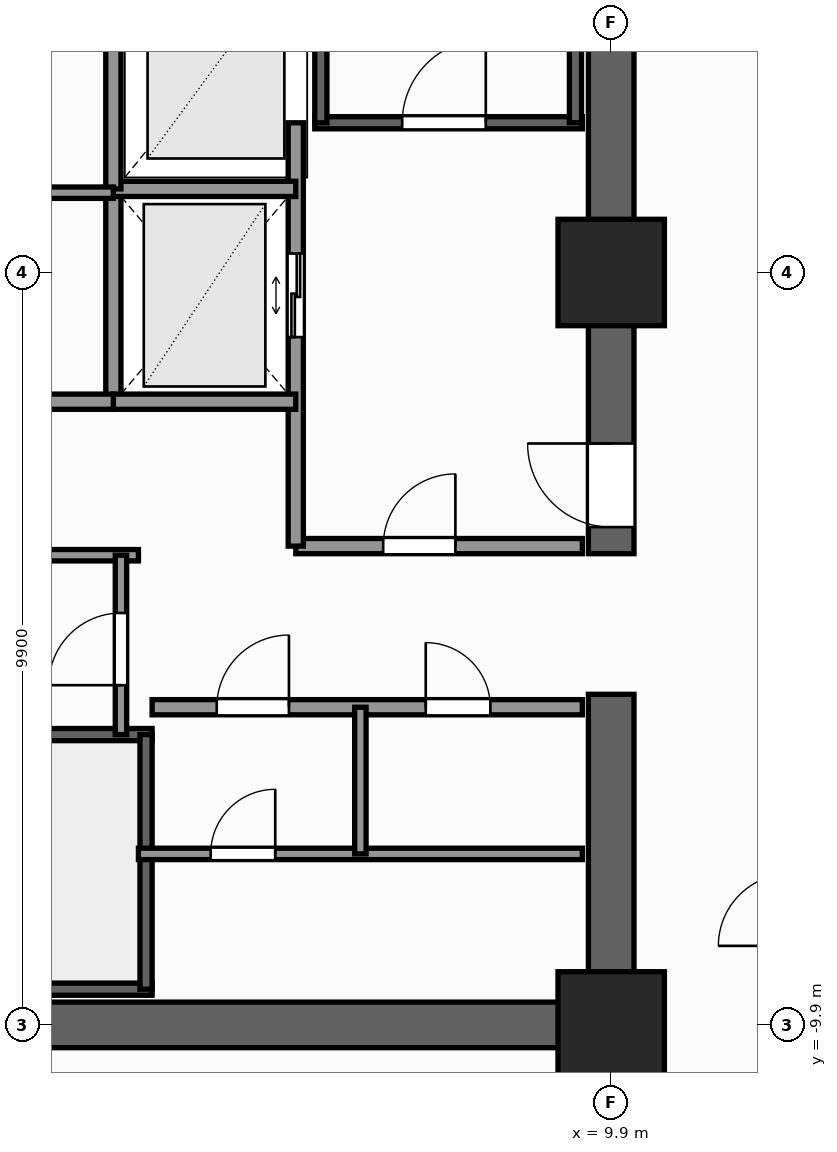
"""IFC4 building model, lengths in metres.
Left out: names, types, materials, properties, quantities, classifications, styles, units other than length and angle.
Written with IfcOpenShell. Run it as: python <this file> out.ifc"""

import sys

from ifc_helpers import new_model, si_unit, direction, frame, frame_2d, origin, origin_2d, place, context, subcontext, project, spatial, rectangle, extrude, element, fill, save


model = new_model("IFC4")
c1 = context("Model", 3, precision=1e-05, world=origin(), true_north=direction((0.0, 1.0)))
c2 = subcontext(c1, "Body", "Model", "MODEL_VIEW")
j1 = project(units=[si_unit("LENGTHUNIT", "METRE"), si_unit("PLANEANGLEUNIT", "RADIAN")], contexts=[c1])
p1 = place(None, origin())
s1 = spatial("IfcSite", under=j1, at=p1, CompositionType="ELEMENT")
p2 = place(p1, origin())
s2 = spatial("IfcBuilding", under=s1, at=p2, CompositionType="ELEMENT")
p3 = place(p2, frame((0.0, 0.0, 68.0)))
s3 = spatial("IfcBuildingStorey", under=s2, at=p3, CompositionType="ELEMENT", Elevation=68.0)
p4 = place(p3, frame((10.2, -9.9, 0.0), z_axis=(0.0, 0.0, 1.0), x_axis=(-1.0, 0.0, 0.0)))
e1 = element("IfcWall", 1, at=p4, inside=s3, PredefinedType="SHEAR", context=c2, shape_type="SweptSolid", body=[
    extrude(rectangle(XDim=12.06, YDim=0.6, at=frame_2d((6.03, 0.0))), origin(), (0.0, 0.0, 1.0), 4.2),
])
p5 = place(p3, frame((9.9, -9.6, 0.0), z_axis=(0.0, 0.0, 1.0), x_axis=(0.0, 1.0, 0.0)))
e2 = element("IfcWall", 2, at=p5, inside=s3, PredefinedType="SHEAR", context=c2, shape_type="SweptSolid", body=[
    extrude(rectangle(XDim=4.05, YDim=0.6, at=frame_2d((2.025, 0.0))), origin(), (0.0, 0.0, 1.0), 4.2),
])
p6 = place(p3, frame((9.9, -3.7, 0.0), z_axis=(0.0, 0.0, 1.0), x_axis=(0.0, 1.0, 0.0)))
e3 = element("IfcWall", 3, at=p6, inside=s3, PredefinedType="SHEAR", context=c2, shape_type="SweptSolid", body=[
    extrude(rectangle(XDim=13.3, YDim=0.6, at=frame_2d((6.65, 0.0))), origin(), (0.0, 0.0, 1.0), 4.2),
])
p7 = place(p6, frame((0.35, 0.0, 0.0)))
e4 = element("IfcOpeningElement", 4, at=p7, cuts=e3, PredefinedType="OPENING", context=c2, shape_type="SweptSolid", body=[
    extrude(rectangle(XDim=1.1, YDim=2.2, at=frame_2d((0.55, 1.1))), frame((0.0, 0.31, 0.0), z_axis=(0.0, -1.0, 0.0), x_axis=(1.0, 0.0, 0.0)), (0.0, 0.0, 1.0), 0.62),
])
for number, where, z_axis, x_axis in (
    (5, (9.9, -9.9, 0.0), (0.0, 0.0, 1.0), (1.0, 0.0, 0.0)),
    (6, (9.9, 0.0, 0.0), (0.0, 0.0, 1.0), (1.0, 0.0, 0.0)),
):
    element("IfcColumn", number, at=place(p3, frame(where, z_axis=z_axis, x_axis=x_axis)), inside=s3, PredefinedType="COLUMN", context=c2, shape_type="SweptSolid", body=[
        extrude(rectangle(XDim=1.4, YDim=1.4, at=origin_2d()), origin(), (0.0, 0.0, 1.0), 4.2),
    ])
p8 = place(p3, frame((6.0, 1.97, 0.0), z_axis=(0.0, 0.0, 1.0), x_axis=(1.0, 0.0, 0.0)))
e7 = element("IfcWall", 7, at=p8, inside=s3, PredefinedType="SHEAR", context=c2, shape_type="SweptSolid", body=[
    extrude(rectangle(XDim=3.52, YDim=0.16, at=frame_2d((1.76, 0.0))), origin(), (0.0, 0.0, 1.0), 4.2),
])
p9 = place(p8, frame((1.15, 0.0, 0.0)))
e8 = element("IfcOpeningElement", 8, at=p9, cuts=e7, PredefinedType="OPENING", context=c2, shape_type="SweptSolid", body=[
    extrude(rectangle(XDim=1.1, YDim=2.2, at=frame_2d((0.55, 1.1))), frame((0.0, 0.09, 0.0), z_axis=(0.0, -1.0, 0.0), x_axis=(1.0, 0.0, 0.0)), (0.0, 0.0, 1.0), 0.18),
])
for number, where, z_axis, x_axis in (
    (9, (6.08, 1.97, 0.0), (0.0, 0.0, 1.0), (0.0, 1.0, 0.0)),
    (10, (9.43, 1.97, 0.0), (0.0, 0.0, 1.0), (0.0, 1.0, 0.0)),
):
    element("IfcWall", number, at=place(p3, frame(where, z_axis=z_axis, x_axis=x_axis)), inside=s3, PredefinedType="SHEAR", context=c2, shape_type="SweptSolid", body=[
        extrude(rectangle(XDim=7.56, YDim=0.16, at=frame_2d((3.78, 0.0))), origin(), (0.0, 0.0, 1.0), 4.2),
    ])
p10 = place(p3, frame((3.86, -9.43, 0.0), z_axis=(0.0, 0.0, 1.0), x_axis=(-1.0, 0.0, 0.0)))
e11 = element("IfcWall", 11, at=p10, inside=s3, PredefinedType="SHEAR", context=c2, shape_type="SweptSolid", body=[
    extrude(rectangle(XDim=7.72, YDim=0.16, at=frame_2d((3.86, 0.0))), origin(), (0.0, 0.0, 1.0), 4.2),
])
p11 = place(p10, frame((6.01, 0.0, 0.0)))
e12 = element("IfcOpeningElement", 12, at=p11, cuts=e11, PredefinedType="OPENING", context=c2, shape_type="SweptSolid", body=[
    extrude(rectangle(XDim=1.1, YDim=2.2, at=frame_2d((0.55, 1.1))), frame((0.0, 0.09, 0.0), z_axis=(0.0, -1.0, 0.0), x_axis=(1.0, 0.0, 0.0)), (0.0, 0.0, 1.0), 0.18),
])
p12 = place(p3, frame((-3.86, -6.08, 0.0), z_axis=(0.0, 0.0, 1.0), x_axis=(1.0, 0.0, 0.0)))
e13 = element("IfcWall", 13, at=p12, inside=s3, PredefinedType="SHEAR", context=c2, shape_type="SweptSolid", body=[
    extrude(rectangle(XDim=7.72, YDim=0.16, at=frame_2d((3.86, 0.0))), origin(), (0.0, 0.0, 1.0), 4.2),
])
p13 = place(p3, frame((3.78, -9.43, 0.0), z_axis=(0.0, 0.0, 1.0), x_axis=(0.0, 1.0, 0.0)))
e14 = element("IfcWall", 14, at=p13, inside=s3, PredefinedType="SHEAR", context=c2, shape_type="SweptSolid", body=[
    extrude(rectangle(XDim=3.35, YDim=0.16, at=frame_2d((1.675, 0.0))), origin(), (0.0, 0.0, 1.0), 4.2),
])
p14 = place(p3, frame((5.75, -3.6, 0.0), z_axis=(0.0, 0.0, 1.0), x_axis=(1.0, 0.0, 0.0)))
e15 = element("IfcWall", 15, at=p14, inside=s3, PredefinedType="SOLIDWALL", context=c2, shape_type="SweptSolid", body=[
    extrude(rectangle(XDim=3.77, YDim=0.2, at=frame_2d((1.885, 0.0))), origin(), (0.0, 0.0, 1.0), 3.98),
])
p15 = place(p14, frame((1.15, 0.0, 0.0)))
e16 = element("IfcOpeningElement", 16, at=p15, cuts=e15, PredefinedType="OPENING", context=c2, shape_type="SweptSolid", body=[
    extrude(rectangle(XDim=0.95, YDim=2.06, at=frame_2d((0.475, 1.03))), frame((0.0, 0.11, 0.0), z_axis=(0.0, -1.0, 0.0), x_axis=(1.0, 0.0, 0.0)), (0.0, 0.0, 1.0), 0.22),
])
p16 = place(p3, frame((5.75, -3.6, 0.0), z_axis=(0.0, 0.0, 1.0), x_axis=(0.0, 1.0, 0.0)))
e17 = element("IfcWall", 17, at=p16, inside=s3, PredefinedType="SOLIDWALL", context=c2, shape_type="SweptSolid", body=[
    extrude(rectangle(XDim=5.57, YDim=0.2, at=frame_2d((2.785, 0.0))), origin(), (0.0, 0.0, 1.0), 3.98),
])
p17 = place(p16, frame((2.75, 0.0, 0.0)))
e18 = element("IfcOpeningElement", 18, at=p17, cuts=e17, PredefinedType="OPENING", context=c2, shape_type="SweptSolid", body=[
    extrude(rectangle(XDim=1.1, YDim=2.2, at=frame_2d((0.55, 1.1))), frame((0.0, 0.11, 0.0), z_axis=(0.0, -1.0, 0.0), x_axis=(1.0, 0.0, 0.0)), (0.0, 0.0, 1.0), 0.22),
])
p18 = place(p3, frame((3.35, -1.7, 0.0), z_axis=(0.0, 0.0, 1.0), x_axis=(0.0, 1.0, 0.0)))
e19 = element("IfcWall", 19, at=p18, inside=s3, PredefinedType="SOLIDWALL", context=c2, shape_type="SweptSolid", body=[
    extrude(rectangle(XDim=2.8, YDim=0.2, at=frame_2d((1.4, 0.0))), origin(), (0.0, 0.0, 1.0), 3.98),
])
for number, where, z_axis, x_axis in (
    (20, (3.35, -1.7, 0.0), (0.0, 0.0, 1.0), (1.0, 0.0, 0.0)),
    (21, (3.35, 1.1, 0.0), (0.0, 0.0, 1.0), (1.0, 0.0, 0.0)),
):
    element("IfcWall", number, at=place(p3, frame(where, z_axis=z_axis, x_axis=x_axis)), inside=s3, PredefinedType="SOLIDWALL", context=c2, shape_type="SweptSolid", body=[
        extrude(rectangle(XDim=2.4, YDim=0.2, at=frame_2d((1.2, 0.0))), origin(), (0.0, 0.0, 1.0), 3.98),
    ])
p19 = place(p3, frame((3.86, -5.72, 0.0), z_axis=(0.0, 0.0, 1.0), x_axis=(1.0, 0.0, 0.0)))
e22 = element("IfcWall", 22, at=p19, inside=s3, PredefinedType="SOLIDWALL", context=c2, shape_type="SweptSolid", body=[
    extrude(rectangle(XDim=5.66, YDim=0.2, at=frame_2d((2.83, 0.0))), origin(), (0.0, 0.0, 1.0), 3.98),
])
p20 = place(p19, frame((0.85, 0.0, 0.0)))
e23 = element("IfcOpeningElement", 23, at=p20, cuts=e22, PredefinedType="OPENING", context=c2, shape_type="SweptSolid", body=[
    extrude(rectangle(XDim=0.95, YDim=2.06, at=frame_2d((0.475, 1.03))), frame((0.0, 0.11, 0.0), z_axis=(0.0, -1.0, 0.0), x_axis=(1.0, 0.0, 0.0)), (0.0, 0.0, 1.0), 0.22),
])
p21 = place(p19, frame((3.6, 0.0, 0.0)))
e24 = element("IfcOpeningElement", 24, at=p21, cuts=e22, PredefinedType="OPENING", context=c2, shape_type="SweptSolid", body=[
    extrude(rectangle(XDim=0.85, YDim=2.03, at=frame_2d((0.425, 1.015))), frame((0.0, 0.11, 0.0), z_axis=(0.0, -1.0, 0.0), x_axis=(1.0, 0.0, 0.0)), (0.0, 0.0, 1.0), 0.22),
])
p22 = place(p3, frame((3.68, -7.65, 0.0), z_axis=(0.0, 0.0, 1.0), x_axis=(1.0, 0.0, 0.0)))
e25 = element("IfcWall", 25, at=p22, inside=s3, PredefinedType="PARTITIONING", context=c2, shape_type="SweptSolid", body=[
    extrude(rectangle(XDim=5.84, YDim=0.15, at=frame_2d((2.92, 0.0))), origin(), (0.0, 0.0, 1.0), 3.98),
])
p23 = place(p22, frame((0.95, 0.0, 0.0)))
e26 = element("IfcOpeningElement", 26, at=p23, cuts=e25, PredefinedType="OPENING", context=c2, shape_type="SweptSolid", body=[
    extrude(rectangle(XDim=0.85, YDim=2.03, at=frame_2d((0.425, 1.015))), frame((0.0, 0.085, 0.0), z_axis=(0.0, -1.0, 0.0), x_axis=(1.0, 0.0, 0.0)), (0.0, 0.0, 1.0), 0.17),
])
p24 = place(p3, frame((6.6, -7.65, 0.0), z_axis=(0.0, 0.0, 1.0), x_axis=(0.0, 1.0, 0.0)))
e27 = element("IfcWall", 27, at=p24, inside=s3, PredefinedType="PARTITIONING", context=c2, shape_type="SweptSolid", body=[
    extrude(rectangle(XDim=1.93, YDim=0.15, at=frame_2d((0.965, 0.0))), origin(), (0.0, 0.0, 1.0), 3.98),
])
p25 = place(p3, frame((-3.35, -1.7, 0.0), z_axis=(0.0, 0.0, 1.0), x_axis=(1.0, 0.0, 0.0)))
e28 = element("IfcWall", 28, at=p25, inside=s3, PredefinedType="SOLIDWALL", context=c2, shape_type="SweptSolid", body=[
    extrude(rectangle(XDim=6.7, YDim=0.2, at=frame_2d((3.35, 0.0))), origin(), (0.0, 0.0, 1.0), 3.98),
])
p26 = place(p3, frame((3.35, 1.1, 0.0), z_axis=(0.0, 0.0, 1.0), x_axis=(0.0, 1.0, 0.0)))
e29 = element("IfcWall", 29, at=p26, inside=s3, PredefinedType="SOLIDWALL", context=c2, shape_type="SweptSolid", body=[
    extrude(rectangle(XDim=3.2, YDim=0.2, at=frame_2d((1.6, 0.0))), origin(), (0.0, 0.0, 1.0), 3.98),
])
p27 = place(p3, frame((-3.35, 1.05, 0.0), z_axis=(0.0, 0.0, 1.0), x_axis=(1.0, 0.0, 0.0)))
e30 = element("IfcWall", 30, at=p27, inside=s3, PredefinedType="PARTITIONING", context=c2, shape_type="SweptSolid", body=[
    extrude(rectangle(XDim=6.7, YDim=0.15, at=frame_2d((3.35, 0.0))), origin(), (0.0, 0.0, 1.0), 3.98),
])
p28 = place(p27, frame((4.2, 0.0, 0.0)))
e31 = element("IfcOpeningElement", 31, at=p28, cuts=e30, PredefinedType="OPENING", context=c2, shape_type="SweptSolid", body=[
    extrude(rectangle(XDim=0.85, YDim=2.03, at=frame_2d((0.425, 1.015))), frame((0.0, 0.085, 0.0), z_axis=(0.0, -1.0, 0.0), x_axis=(1.0, 0.0, 0.0)), (0.0, 0.0, 1.0), 0.17),
])
p29 = place(p3, frame((-3.68, -3.72, 0.0), z_axis=(0.0, 0.0, 1.0), x_axis=(1.0, 0.0, 0.0)))
e32 = element("IfcWall", 32, at=p29, inside=s3, PredefinedType="PARTITIONING", context=c2, shape_type="SweptSolid", body=[
    extrude(rectangle(XDim=7.36, YDim=0.15, at=frame_2d((3.68, 0.0))), origin(), (0.0, 0.0, 1.0), 3.98),
])
p30 = place(p3, frame((3.45, -6.08, 0.0), z_axis=(0.0, 0.0, 1.0), x_axis=(0.0, 1.0, 0.0)))
e33 = element("IfcWall", 33, at=p30, inside=s3, PredefinedType="PARTITIONING", context=c2, shape_type="SweptSolid", body=[
    extrude(rectangle(XDim=2.36, YDim=0.15, at=frame_2d((1.18, 0.0))), origin(), (0.0, 0.0, 1.0), 3.98),
])
p31 = place(p30, frame((0.65, 0.0, 0.0)))
e34 = element("IfcOpeningElement", 34, at=p31, cuts=e33, PredefinedType="OPENING", context=c2, shape_type="SweptSolid", body=[
    extrude(rectangle(XDim=0.95, YDim=2.06, at=frame_2d((0.475, 1.03))), frame((0.0, 0.085, 0.0), z_axis=(0.0, -1.0, 0.0), x_axis=(1.0, 0.0, 0.0)), (0.0, 0.0, 1.0), 0.17),
])
p32 = place(p9, origin())
e35 = element("IfcDoor", 35, at=p32, inside=s3, OperationType="SINGLE_SWING_RIGHT", PredefinedType="DOOR", context=c2, shape_type="SweptSolid", body=[
    extrude(rectangle(XDim=1.1, YDim=2.2, at=frame_2d((0.55, 1.1))), frame((0.0, 0.025, 0.0), z_axis=(0.0, -1.0, 0.0), x_axis=(1.0, 0.0, 0.0)), (0.0, 0.0, 1.0), 0.05),
])
fill(e8, e35)
p33 = place(p7, origin())
e36 = element("IfcDoor", 36, at=p33, inside=s3, OperationType="SINGLE_SWING_RIGHT", PredefinedType="DOOR", context=c2, shape_type="SweptSolid", body=[
    extrude(rectangle(XDim=1.1, YDim=2.2, at=frame_2d((0.55, 1.1))), frame((0.0, 0.025, 0.0), z_axis=(0.0, -1.0, 0.0), x_axis=(1.0, 0.0, 0.0)), (0.0, 0.0, 1.0), 0.05),
])
fill(e4, e36)
p34 = place(p17, origin())
e37 = element("IfcDoor", 37, at=p34, inside=s3, OperationType="DOUBLE_DOOR_SLIDING", PredefinedType="DOOR", context=c2, shape_type="SweptSolid", body=[
    extrude(rectangle(XDim=1.1, YDim=2.2, at=frame_2d((0.55, 1.1))), frame((0.0, 0.025, 0.0), z_axis=(0.0, -1.0, 0.0), x_axis=(1.0, 0.0, 0.0)), (0.0, 0.0, 1.0), 0.05),
])
fill(e18, e37)
p35 = place(p20, origin())
e38 = element("IfcDoor", 38, at=p35, inside=s3, OperationType="SINGLE_SWING_RIGHT", PredefinedType="DOOR", context=c2, shape_type="SweptSolid", body=[
    extrude(rectangle(XDim=0.95, YDim=2.06, at=frame_2d((0.475, 1.03))), frame((0.0, 0.025, 0.0), z_axis=(0.0, -1.0, 0.0), x_axis=(1.0, 0.0, 0.0)), (0.0, 0.0, 1.0), 0.05),
])
fill(e23, e38)
p36 = place(p21, origin())
e39 = element("IfcDoor", 39, at=p36, inside=s3, OperationType="SINGLE_SWING_LEFT", PredefinedType="DOOR", context=c2, shape_type="SweptSolid", body=[
    extrude(rectangle(XDim=0.85, YDim=2.03, at=frame_2d((0.425, 1.015))), frame((0.0, 0.025, 0.0), z_axis=(0.0, -1.0, 0.0), x_axis=(1.0, 0.0, 0.0)), (0.0, 0.0, 1.0), 0.05),
])
fill(e24, e39)
p37 = place(p23, origin())
e40 = element("IfcDoor", 40, at=p37, inside=s3, OperationType="SINGLE_SWING_RIGHT", PredefinedType="DOOR", context=c2, shape_type="SweptSolid", body=[
    extrude(rectangle(XDim=0.85, YDim=2.03, at=frame_2d((0.425, 1.015))), frame((0.0, 0.025, 0.0), z_axis=(0.0, -1.0, 0.0), x_axis=(1.0, 0.0, 0.0)), (0.0, 0.0, 1.0), 0.05),
])
fill(e26, e40)
p38 = place(p15, origin())
e41 = element("IfcDoor", 41, at=p38, inside=s3, OperationType="SINGLE_SWING_RIGHT", PredefinedType="DOOR", context=c2, shape_type="SweptSolid", body=[
    extrude(rectangle(XDim=0.95, YDim=2.06, at=frame_2d((0.475, 1.03))), frame((0.0, 0.025, 0.0), z_axis=(0.0, -1.0, 0.0), x_axis=(1.0, 0.0, 0.0)), (0.0, 0.0, 1.0), 0.05),
])
fill(e16, e41)
p39 = place(p31, origin())
e42 = element("IfcDoor", 42, at=p39, inside=s3, OperationType="SINGLE_SWING_LEFT", PredefinedType="DOOR", context=c2, shape_type="SweptSolid", body=[
    extrude(rectangle(XDim=0.95, YDim=2.06, at=frame_2d((0.475, 1.03))), frame((0.0, 0.025, 0.0), z_axis=(0.0, -1.0, 0.0), x_axis=(1.0, 0.0, 0.0)), (0.0, 0.0, 1.0), 0.05),
])
fill(e34, e42)
save(model, sys.argv[1])
